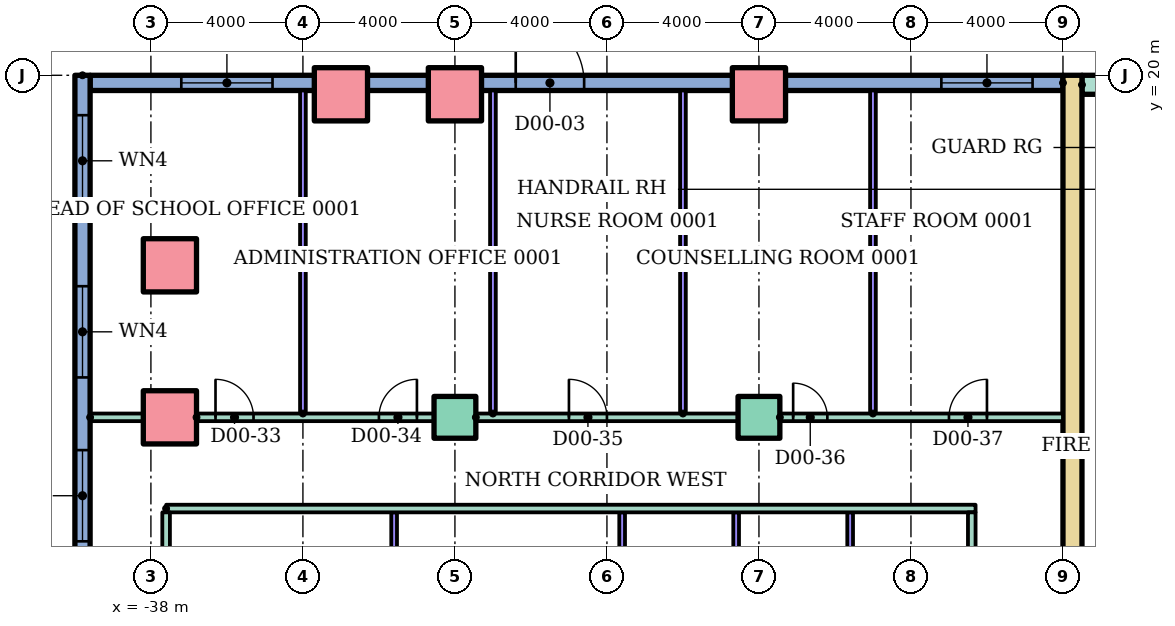
"""IFC4 building model, lengths in metres.
Left out: names, types, materials, properties, quantities, classifications, styles, units other than length and angle.
Written with IfcOpenShell. Run it as: python <this file> out.ifc"""

import sys

from ifc_helpers import new_model, si_unit, direction, frame, frame_2d, origin, origin_2d, place, context, subcontext, project, spatial, rectangle, hollow_rectangle, extrude, element, fill, save


model = new_model("IFC4")
c1 = context("Model", 3, precision=1e-05, world=origin(), true_north=direction((0.0, 1.0)))
c2 = subcontext(c1, "Body", "Model", "MODEL_VIEW")
j1 = project(units=[si_unit("LENGTHUNIT", "METRE"), si_unit("PLANEANGLEUNIT", "RADIAN")], contexts=[c1])
p1 = place(None, origin())
s1 = spatial("IfcSite", under=j1, at=p1, CompositionType="ELEMENT")
p2 = place(p1, origin())
s2 = spatial("IfcBuilding", under=s1, at=p2, CompositionType="ELEMENT")
p3 = place(p2, origin())
s3 = spatial("IfcBuildingStorey", under=s2, at=p3, CompositionType="ELEMENT", Elevation=0.0)
p4 = place(p3, frame((-37.5, 11.0, 0.0)))
e1 = element("IfcColumn", 1, at=p4, inside=s3, PredefinedType="COLUMN", context=c2, shape_type="SweptSolid", body=[
    extrude(hollow_rectangle(XDim=1.4, YDim=1.4, WallThickness=0.08, at=origin_2d()), origin(), (0.0, 0.0, 1.0), 6.0),
])
for number, where in (
    (2, (-30.0, 11.0, 0.0)),
    (3, (-22.0, 11.0, 0.0)),
):
    element("IfcColumn", number, at=place(p3, frame(where)), inside=s3, PredefinedType="COLUMN", context=c2, shape_type="SweptSolid", body=[
        extrude(rectangle(XDim=1.1, YDim=1.1, at=origin_2d()), origin(), (0.0, 0.0, 1.0), 6.0),
    ])
for number, where in (
    (4, (-37.5, 15.0, 0.0)),
    (5, (-33.0, 19.5, 0.0)),
    (6, (-30.0, 19.5, 0.0)),
    (7, (-22.0, 19.5, 0.0)),
):
    element("IfcColumn", number, at=place(p3, frame(where)), inside=s3, PredefinedType="COLUMN", context=c2, shape_type="SweptSolid", body=[
        extrude(hollow_rectangle(XDim=1.4, YDim=1.4, WallThickness=0.08, at=origin_2d()), origin(), (0.0, 0.0, 1.0), 6.0),
    ])
p5 = place(p3, frame((-14.0, 19.8, 0.0), z_axis=(0.0, 0.0, 1.0), x_axis=(-1.0, 0.0, 0.0)))
e8 = element("IfcWall", 8, at=p5, inside=s3, PredefinedType="STANDARD", context=c2, shape_type="SweptSolid", body=[
    extrude(rectangle(XDim=25.6, YDim=0.4, at=frame_2d((12.8, 0.0))), origin(), (0.0, 0.0, 1.0), 5.7),
])
p6 = place(p5, frame((12.6, 0.0, 0.0)))
e9 = element("IfcOpeningElement", 9, at=p6, cuts=e8, PredefinedType="OPENING", context=c2, shape_type="SweptSolid", body=[
    extrude(rectangle(XDim=1.8, YDim=2.4, at=frame_2d((0.9, 1.2))), frame((0.0, 0.21, 0.0), z_axis=(0.0, -1.0, 0.0), x_axis=(1.0, 0.0, 0.0)), (0.0, 0.0, 1.0), 0.42),
])
p7 = place(p5, frame((0.8, 0.0, 0.9)))
e10 = element("IfcOpeningElement", 10, at=p7, cuts=e8, PredefinedType="OPENING", context=c2, shape_type="SweptSolid", body=[
    extrude(rectangle(XDim=2.4, YDim=2.4, at=frame_2d((1.2, 1.2))), frame((0.0, 0.21, 0.0), z_axis=(0.0, -1.0, 0.0), x_axis=(1.0, 0.0, 0.0)), (0.0, 0.0, 1.0), 0.42),
])
p8 = place(p5, frame((20.8, 0.0, 0.9)))
e11 = element("IfcOpeningElement", 11, at=p8, cuts=e8, PredefinedType="OPENING", context=c2, shape_type="SweptSolid", body=[
    extrude(rectangle(XDim=2.4, YDim=2.4, at=frame_2d((1.2, 1.2))), frame((0.0, 0.21, 0.0), z_axis=(0.0, -1.0, 0.0), x_axis=(1.0, 0.0, 0.0)), (0.0, 0.0, 1.0), 0.42),
])
p9 = place(p3, frame((-39.8, 20.0, 0.0), z_axis=(0.0, 0.0, 1.0), x_axis=(0.0, -1.0, 0.0)))
e12 = element("IfcWall", 12, at=p9, inside=s3, PredefinedType="STANDARD", context=c2, shape_type="SweptSolid", body=[
    extrude(rectangle(XDim=70.0, YDim=0.4, at=frame_2d((35.0, 0.0))), origin(), (0.0, 0.0, 1.0), 5.7),
])
p10 = place(p9, frame((50.267, 0.0, 0.0)))
e13 = element("IfcOpeningElement", 13, at=p10, cuts=e12, PredefinedType="OPENING", context=c2, shape_type="SweptSolid", body=[
    extrude(rectangle(XDim=1.8, YDim=2.4, at=frame_2d((0.9, 1.2))), frame((0.0, 0.21, 0.0), z_axis=(0.0, -1.0, 0.0), x_axis=(1.0, 0.0, 0.0)), (0.0, 0.0, 1.0), 0.42),
])
p11 = place(p9, frame((1.05, 0.0, 0.9)))
e14 = element("IfcOpeningElement", 14, at=p11, cuts=e12, PredefinedType="OPENING", context=c2, shape_type="SweptSolid", body=[
    extrude(rectangle(XDim=2.4, YDim=2.4, at=frame_2d((1.2, 1.2))), frame((0.0, 0.21, 0.0), z_axis=(0.0, -1.0, 0.0), x_axis=(1.0, 0.0, 0.0)), (0.0, 0.0, 1.0), 0.42),
])
p12 = place(p9, frame((5.55, 0.0, 0.9)))
e15 = element("IfcOpeningElement", 15, at=p12, cuts=e12, PredefinedType="OPENING", context=c2, shape_type="SweptSolid", body=[
    extrude(rectangle(XDim=2.4, YDim=2.4, at=frame_2d((1.2, 1.2))), frame((0.0, 0.21, 0.0), z_axis=(0.0, -1.0, 0.0), x_axis=(1.0, 0.0, 0.0)), (0.0, 0.0, 1.0), 0.42),
])
p13 = place(p9, frame((9.863, 0.0, 0.9)))
e16 = element("IfcOpeningElement", 16, at=p13, cuts=e12, PredefinedType="OPENING", context=c2, shape_type="SweptSolid", body=[
    extrude(rectangle(XDim=2.4, YDim=2.4, at=frame_2d((1.2, 1.2))), frame((0.0, 0.21, 0.0), z_axis=(0.0, -1.0, 0.0), x_axis=(1.0, 0.0, 0.0)), (0.0, 0.0, 1.0), 0.42),
])
p14 = place(p9, frame((13.988, 0.0, 0.9)))
e17 = element("IfcOpeningElement", 17, at=p14, cuts=e12, PredefinedType="OPENING", context=c2, shape_type="SweptSolid", body=[
    extrude(rectangle(XDim=2.4, YDim=2.4, at=frame_2d((1.2, 1.2))), frame((0.0, 0.21, 0.0), z_axis=(0.0, -1.0, 0.0), x_axis=(1.0, 0.0, 0.0)), (0.0, 0.0, 1.0), 0.42),
])
p15 = place(p9, frame((18.113, 0.0, 0.9)))
e18 = element("IfcOpeningElement", 18, at=p15, cuts=e12, PredefinedType="OPENING", context=c2, shape_type="SweptSolid", body=[
    extrude(rectangle(XDim=2.4, YDim=2.4, at=frame_2d((1.2, 1.2))), frame((0.0, 0.21, 0.0), z_axis=(0.0, -1.0, 0.0), x_axis=(1.0, 0.0, 0.0)), (0.0, 0.0, 1.0), 0.42),
])
p16 = place(p9, frame((22.238, 0.0, 0.9)))
e19 = element("IfcOpeningElement", 19, at=p16, cuts=e12, PredefinedType="OPENING", context=c2, shape_type="SweptSolid", body=[
    extrude(rectangle(XDim=2.4, YDim=2.4, at=frame_2d((1.2, 1.2))), frame((0.0, 0.21, 0.0), z_axis=(0.0, -1.0, 0.0), x_axis=(1.0, 0.0, 0.0)), (0.0, 0.0, 1.0), 0.42),
])
p17 = place(p9, frame((34.613, 0.0, 0.9)))
e20 = element("IfcOpeningElement", 20, at=p17, cuts=e12, PredefinedType="OPENING", context=c2, shape_type="SweptSolid", body=[
    extrude(rectangle(XDim=2.4, YDim=2.4, at=frame_2d((1.2, 1.2))), frame((0.0, 0.21, 0.0), z_axis=(0.0, -1.0, 0.0), x_axis=(1.0, 0.0, 0.0)), (0.0, 0.0, 1.0), 0.42),
])
p18 = place(p9, frame((42.633, 0.0, 0.9)))
e21 = element("IfcOpeningElement", 21, at=p18, cuts=e12, PredefinedType="OPENING", context=c2, shape_type="SweptSolid", body=[
    extrude(rectangle(XDim=2.4, YDim=2.4, at=frame_2d((1.2, 1.2))), frame((0.0, 0.21, 0.0), z_axis=(0.0, -1.0, 0.0), x_axis=(1.0, 0.0, 0.0)), (0.0, 0.0, 1.0), 0.42),
])
p19 = place(p9, frame((46.3, 0.0, 0.9)))
e22 = element("IfcOpeningElement", 22, at=p19, cuts=e12, PredefinedType="OPENING", context=c2, shape_type="SweptSolid", body=[
    extrude(rectangle(XDim=2.4, YDim=2.4, at=frame_2d((1.2, 1.2))), frame((0.0, 0.21, 0.0), z_axis=(0.0, -1.0, 0.0), x_axis=(1.0, 0.0, 0.0)), (0.0, 0.0, 1.0), 0.42),
])
p20 = place(p9, frame((66.85, 0.0, 0.9)))
e23 = element("IfcOpeningElement", 23, at=p20, cuts=e12, PredefinedType="OPENING", context=c2, shape_type="SweptSolid", body=[
    extrude(rectangle(XDim=2.4, YDim=2.4, at=frame_2d((1.2, 1.2))), frame((0.0, 0.21, 0.0), z_axis=(0.0, -1.0, 0.0), x_axis=(1.0, 0.0, 0.0)), (0.0, 0.0, 1.0), 0.42),
])
p21 = place(p9, frame((28.7, 0.0, 0.0)))
e24 = element("IfcOpeningElement", 24, at=p21, cuts=e12, PredefinedType="OPENING", context=c2, shape_type="SweptSolid", body=[
    extrude(rectangle(XDim=1.8, YDim=2.1, at=frame_2d((0.9, 1.05))), frame((0.0, 0.21, 0.0), z_axis=(0.0, -1.0, 0.0), x_axis=(1.0, 0.0, 0.0)), (0.0, 0.0, 1.0), 0.42),
])
p22 = place(p9, frame((39.9, 0.0, 0.0)))
e25 = element("IfcOpeningElement", 25, at=p22, cuts=e12, PredefinedType="OPENING", context=c2, shape_type="SweptSolid", body=[
    extrude(rectangle(XDim=1.8, YDim=2.1, at=frame_2d((0.9, 1.05))), frame((0.0, 0.21, 0.0), z_axis=(0.0, -1.0, 0.0), x_axis=(1.0, 0.0, 0.0)), (0.0, 0.0, 1.0), 0.42),
])
p23 = place(p3, frame((-13.75, 3.0, 0.0), z_axis=(0.0, 0.0, 1.0), x_axis=(0.0, 1.0, 0.0)))
e26 = element("IfcWall", 26, at=p23, inside=s3, PredefinedType="SHEAR", context=c2, shape_type="SweptSolid", body=[
    extrude(rectangle(XDim=17.0, YDim=0.5, at=frame_2d((8.5, 0.0))), origin(), (0.0, 0.0, 1.0), 5.7),
])
p24 = place(p3, frame((-13.5, 19.75, 0.0)))
e27 = element("IfcWall", 27, at=p24, inside=s3, PredefinedType="SHEAR", context=c2, shape_type="SweptSolid", body=[
    extrude(rectangle(XDim=27.0, YDim=0.5, at=frame_2d((13.5, 0.0))), origin(), (0.0, 0.0, 1.0), 5.7),
])
p25 = place(p24, frame((4.4, 0.0, 0.0)))
e28 = element("IfcOpeningElement", 28, at=p25, cuts=e27, PredefinedType="OPENING", context=c2, shape_type="SweptSolid", body=[
    extrude(rectangle(XDim=0.95, YDim=2.1, at=frame_2d((0.475, 1.05))), frame((0.0, 0.26, 0.0), z_axis=(0.0, -1.0, 0.0), x_axis=(1.0, 0.0, 0.0)), (0.0, 0.0, 1.0), 0.52),
])
p26 = place(p24, frame((10.4, 0.0, 0.0)))
e29 = element("IfcOpeningElement", 29, at=p26, cuts=e27, PredefinedType="OPENING", context=c2, shape_type="SweptSolid", body=[
    extrude(rectangle(XDim=0.95, YDim=2.1, at=frame_2d((0.475, 1.05))), frame((0.0, 0.26, 0.0), z_axis=(0.0, -1.0, 0.0), x_axis=(1.0, 0.0, 0.0)), (0.0, 0.0, 1.0), 0.52),
])
p27 = place(p24, frame((16.4, 0.0, 0.0)))
e30 = element("IfcOpeningElement", 30, at=p27, cuts=e27, PredefinedType="OPENING", context=c2, shape_type="SweptSolid", body=[
    extrude(rectangle(XDim=0.95, YDim=2.1, at=frame_2d((0.475, 1.05))), frame((0.0, 0.26, 0.0), z_axis=(0.0, -1.0, 0.0), x_axis=(1.0, 0.0, 0.0)), (0.0, 0.0, 1.0), 0.52),
])
p28 = place(p3, frame((-37.6, 8.6, 0.0)))
e31 = element("IfcWall", 31, at=p28, inside=s3, PredefinedType="PARTITIONING", context=c2, shape_type="SweptSolid", body=[
    extrude(rectangle(XDim=21.3, YDim=0.2, at=frame_2d((10.65, 0.0))), origin(), (0.0, 0.0, 1.0), 5.7),
])
p29 = place(p3, frame((-39.6, 11.0, 0.0)))
e32 = element("IfcWall", 32, at=p29, inside=s3, PredefinedType="PARTITIONING", context=c2, shape_type="SweptSolid", body=[
    extrude(rectangle(XDim=1.4, YDim=0.2, at=frame_2d((0.7, 0.0))), origin(), (0.0, 0.0, 1.0), 5.7),
])
p30 = place(p3, frame((-36.8, 11.0, 0.0)))
e33 = element("IfcWall", 33, at=p30, inside=s3, PredefinedType="PARTITIONING", context=c2, shape_type="SweptSolid", body=[
    extrude(rectangle(XDim=6.25, YDim=0.2, at=frame_2d((3.125, 0.0))), origin(), (0.0, 0.0, 1.0), 5.7),
])
p31 = place(p30, frame((0.5, 0.0, 0.0)))
e34 = element("IfcOpeningElement", 34, at=p31, cuts=e33, PredefinedType="OPENING", context=c2, shape_type="SweptSolid", body=[
    extrude(rectangle(XDim=1.0, YDim=2.1, at=frame_2d((0.5, 1.05))), frame((0.0, 0.11, 0.0), z_axis=(0.0, -1.0, 0.0), x_axis=(1.0, 0.0, 0.0)), (0.0, 0.0, 1.0), 0.22),
])
p32 = place(p30, frame((4.8, 0.0, 0.0)))
e35 = element("IfcOpeningElement", 35, at=p32, cuts=e33, PredefinedType="OPENING", context=c2, shape_type="SweptSolid", body=[
    extrude(rectangle(XDim=1.0, YDim=2.1, at=frame_2d((0.5, 1.05))), frame((0.0, 0.11, 0.0), z_axis=(0.0, -1.0, 0.0), x_axis=(1.0, 0.0, 0.0)), (0.0, 0.0, 1.0), 0.22),
])
p33 = place(p3, frame((-29.45, 11.0, 0.0)))
e36 = element("IfcWall", 36, at=p33, inside=s3, PredefinedType="PARTITIONING", context=c2, shape_type="SweptSolid", body=[
    extrude(rectangle(XDim=6.9, YDim=0.2, at=frame_2d((3.45, 0.0))), origin(), (0.0, 0.0, 1.0), 5.7),
])
p34 = place(p33, frame((2.45, 0.0, 0.0)))
e37 = element("IfcOpeningElement", 37, at=p34, cuts=e36, PredefinedType="OPENING", context=c2, shape_type="SweptSolid", body=[
    extrude(rectangle(XDim=1.0, YDim=2.1, at=frame_2d((0.5, 1.05))), frame((0.0, 0.11, 0.0), z_axis=(0.0, -1.0, 0.0), x_axis=(1.0, 0.0, 0.0)), (0.0, 0.0, 1.0), 0.22),
])
p35 = place(p3, frame((-21.45, 11.0, 0.0)))
e38 = element("IfcWall", 38, at=p35, inside=s3, PredefinedType="PARTITIONING", context=c2, shape_type="SweptSolid", body=[
    extrude(rectangle(XDim=7.45, YDim=0.2, at=frame_2d((3.725, 0.0))), origin(), (0.0, 0.0, 1.0), 5.7),
])
p36 = place(p35, frame((0.35, 0.0, 0.0)))
e39 = element("IfcOpeningElement", 39, at=p36, cuts=e38, PredefinedType="OPENING", context=c2, shape_type="SweptSolid", body=[
    extrude(rectangle(XDim=0.9, YDim=2.1, at=frame_2d((0.45, 1.05))), frame((0.0, 0.11, 0.0), z_axis=(0.0, -1.0, 0.0), x_axis=(1.0, 0.0, 0.0)), (0.0, 0.0, 1.0), 0.22),
])
p37 = place(p35, frame((4.45, 0.0, 0.0)))
e40 = element("IfcOpeningElement", 40, at=p37, cuts=e38, PredefinedType="OPENING", context=c2, shape_type="SweptSolid", body=[
    extrude(rectangle(XDim=1.0, YDim=2.1, at=frame_2d((0.5, 1.05))), frame((0.0, 0.11, 0.0), z_axis=(0.0, -1.0, 0.0), x_axis=(1.0, 0.0, 0.0)), (0.0, 0.0, 1.0), 0.22),
])
p38 = place(p3, frame((-37.6, 2.7, 0.0), z_axis=(0.0, 0.0, 1.0), x_axis=(0.0, 1.0, 0.0)))
e41 = element("IfcWall", 41, at=p38, inside=s3, PredefinedType="PARTITIONING", context=c2, shape_type="SweptSolid", body=[
    extrude(rectangle(XDim=5.8, YDim=0.2, at=frame_2d((2.9, 0.0))), origin(), (0.0, 0.0, 1.0), 5.7),
])
p39 = place(p38, frame((1.8, 0.0, 0.0)))
e42 = element("IfcOpeningElement", 42, at=p39, cuts=e41, PredefinedType="OPENING", context=c2, shape_type="SweptSolid", body=[
    extrude(rectangle(XDim=1.0, YDim=2.1, at=frame_2d((0.5, 1.05))), frame((0.0, 0.11, 0.0), z_axis=(0.0, -1.0, 0.0), x_axis=(1.0, 0.0, 0.0)), (0.0, 0.0, 1.0), 0.22),
])
p40 = place(p3, frame((-34.0, 11.1, 0.0), z_axis=(0.0, 0.0, 1.0), x_axis=(0.0, 1.0, 0.0)))
e43 = element("IfcWall", 43, at=p40, inside=s3, PredefinedType="PARTITIONING", context=c2, shape_type="SweptSolid", body=[
    extrude(rectangle(XDim=8.5, YDim=0.15, at=frame_2d((4.25, 0.0))), origin(), (0.0, 0.0, 1.0), 5.7),
])
p41 = place(p3, frame((-31.6, 1.5, 0.0), z_axis=(0.0, 0.0, 1.0), x_axis=(0.0, 1.0, 0.0)))
e44 = element("IfcWall", 44, at=p41, inside=s3, PredefinedType="PARTITIONING", context=c2, shape_type="SweptSolid", body=[
    extrude(rectangle(XDim=7.0, YDim=0.15, at=frame_2d((3.5, 0.0))), origin(), (0.0, 0.0, 1.0), 5.7),
])
p42 = place(p3, frame((-29.0, 11.1, 0.0), z_axis=(0.0, 0.0, 1.0), x_axis=(0.0, 1.0, 0.0)))
e45 = element("IfcWall", 45, at=p42, inside=s3, PredefinedType="PARTITIONING", context=c2, shape_type="SweptSolid", body=[
    extrude(rectangle(XDim=8.5, YDim=0.15, at=frame_2d((4.25, 0.0))), origin(), (0.0, 0.0, 1.0), 5.7),
])
p43 = place(p3, frame((-25.6, 1.5, 0.0), z_axis=(0.0, 0.0, 1.0), x_axis=(0.0, 1.0, 0.0)))
e46 = element("IfcWall", 46, at=p43, inside=s3, PredefinedType="PARTITIONING", context=c2, shape_type="SweptSolid", body=[
    extrude(rectangle(XDim=7.0, YDim=0.15, at=frame_2d((3.5, 0.0))), origin(), (0.0, 0.0, 1.0), 5.7),
])
p44 = place(p3, frame((-24.0, 11.1, 0.0), z_axis=(0.0, 0.0, 1.0), x_axis=(0.0, 1.0, 0.0)))
e47 = element("IfcWall", 47, at=p44, inside=s3, PredefinedType="PARTITIONING", context=c2, shape_type="SweptSolid", body=[
    extrude(rectangle(XDim=8.5, YDim=0.15, at=frame_2d((4.25, 0.0))), origin(), (0.0, 0.0, 1.0), 5.7),
])
p45 = place(p3, frame((-22.6, 2.55, 0.0), z_axis=(0.0, 0.0, 1.0), x_axis=(0.0, 1.0, 0.0)))
e48 = element("IfcWall", 48, at=p45, inside=s3, PredefinedType="PARTITIONING", context=c2, shape_type="SweptSolid", body=[
    extrude(rectangle(XDim=5.95, YDim=0.15, at=frame_2d((2.975, 0.0))), origin(), (0.0, 0.0, 1.0), 5.7),
])
p46 = place(p3, frame((-19.6, 1.5, 0.0), z_axis=(0.0, 0.0, 1.0), x_axis=(0.0, 1.0, 0.0)))
e49 = element("IfcWall", 49, at=p46, inside=s3, PredefinedType="PARTITIONING", context=c2, shape_type="SweptSolid", body=[
    extrude(rectangle(XDim=7.0, YDim=0.15, at=frame_2d((3.5, 0.0))), origin(), (0.0, 0.0, 1.0), 5.7),
])
p47 = place(p3, frame((-19.0, 11.1, 0.0), z_axis=(0.0, 0.0, 1.0), x_axis=(0.0, 1.0, 0.0)))
e50 = element("IfcWall", 50, at=p47, inside=s3, PredefinedType="PARTITIONING", context=c2, shape_type="SweptSolid", body=[
    extrude(rectangle(XDim=8.5, YDim=0.15, at=frame_2d((4.25, 0.0))), origin(), (0.0, 0.0, 1.0), 5.7),
])
p48 = place(p3, frame((-16.4, 1.5, 0.0), z_axis=(0.0, 0.0, 1.0), x_axis=(0.0, 1.0, 0.0)))
e51 = element("IfcWall", 51, at=p48, inside=s3, PredefinedType="PARTITIONING", context=c2, shape_type="SweptSolid", body=[
    extrude(rectangle(XDim=7.0, YDim=0.2, at=frame_2d((3.5, 0.0))), origin(), (0.0, 0.0, 1.0), 5.7),
])
p49 = place(p6, frame((1.8, 0.0, 0.0), z_axis=(0.0, 0.0, 1.0), x_axis=(-1.0, 0.0, 0.0)))
e52 = element("IfcDoor", 52, at=p49, inside=s3, OperationType="DOUBLE_DOOR_SINGLE_SWING", PredefinedType="DOOR", context=c2, shape_type="SweptSolid", body=[
    extrude(rectangle(XDim=1.8, YDim=2.4, at=frame_2d((0.9, 1.2))), frame((0.0, 0.025, 0.0), z_axis=(0.0, -1.0, 0.0), x_axis=(1.0, 0.0, 0.0)), (0.0, 0.0, 1.0), 0.05),
])
fill(e9, e52)
p50 = place(p7, origin())
e53 = element("IfcWindow", 53, at=p50, inside=s3, PartitioningType="SINGLE_PANEL", PredefinedType="WINDOW", context=c2, shape_type="SweptSolid", body=[
    extrude(rectangle(XDim=2.4, YDim=2.4, at=frame_2d((1.2, 1.2))), frame((0.0, 0.03, 0.0), z_axis=(0.0, -1.0, 0.0), x_axis=(1.0, 0.0, 0.0)), (0.0, 0.0, 1.0), 0.06),
])
fill(e10, e53)
p51 = place(p8, origin())
e54 = element("IfcWindow", 54, at=p51, inside=s3, PartitioningType="SINGLE_PANEL", PredefinedType="WINDOW", context=c2, shape_type="SweptSolid", body=[
    extrude(rectangle(XDim=2.4, YDim=2.4, at=frame_2d((1.2, 1.2))), frame((0.0, 0.03, 0.0), z_axis=(0.0, -1.0, 0.0), x_axis=(1.0, 0.0, 0.0)), (0.0, 0.0, 1.0), 0.06),
])
fill(e11, e54)
p52 = place(p11, origin())
e55 = element("IfcWindow", 55, at=p52, inside=s3, PartitioningType="SINGLE_PANEL", PredefinedType="WINDOW", context=c2, shape_type="SweptSolid", body=[
    extrude(rectangle(XDim=2.4, YDim=2.4, at=frame_2d((1.2, 1.2))), frame((0.0, 0.03, 0.0), z_axis=(0.0, -1.0, 0.0), x_axis=(1.0, 0.0, 0.0)), (0.0, 0.0, 1.0), 0.06),
])
fill(e14, e55)
p53 = place(p12, origin())
e56 = element("IfcWindow", 56, at=p53, inside=s3, PartitioningType="SINGLE_PANEL", PredefinedType="WINDOW", context=c2, shape_type="SweptSolid", body=[
    extrude(rectangle(XDim=2.4, YDim=2.4, at=frame_2d((1.2, 1.2))), frame((0.0, 0.03, 0.0), z_axis=(0.0, -1.0, 0.0), x_axis=(1.0, 0.0, 0.0)), (0.0, 0.0, 1.0), 0.06),
])
fill(e15, e56)
p54 = place(p13, origin())
e57 = element("IfcWindow", 57, at=p54, inside=s3, PartitioningType="SINGLE_PANEL", PredefinedType="WINDOW", context=c2, shape_type="SweptSolid", body=[
    extrude(rectangle(XDim=2.4, YDim=2.4, at=frame_2d((1.2, 1.2))), frame((0.0, 0.03, 0.0), z_axis=(0.0, -1.0, 0.0), x_axis=(1.0, 0.0, 0.0)), (0.0, 0.0, 1.0), 0.06),
])
fill(e16, e57)
p55 = place(p31, origin())
e58 = element("IfcDoor", 58, at=p55, inside=s3, OperationType="SINGLE_SWING_LEFT", PredefinedType="DOOR", context=c2, shape_type="SweptSolid", body=[
    extrude(rectangle(XDim=1.0, YDim=2.1, at=frame_2d((0.5, 1.05))), frame((0.0, 0.025, 0.0), z_axis=(0.0, -1.0, 0.0), x_axis=(1.0, 0.0, 0.0)), (0.0, 0.0, 1.0), 0.05),
])
fill(e34, e58)
p56 = place(p32, origin())
e59 = element("IfcDoor", 59, at=p56, inside=s3, OperationType="SINGLE_SWING_RIGHT", PredefinedType="DOOR", context=c2, shape_type="SweptSolid", body=[
    extrude(rectangle(XDim=1.0, YDim=2.1, at=frame_2d((0.5, 1.05))), frame((0.0, 0.025, 0.0), z_axis=(0.0, -1.0, 0.0), x_axis=(1.0, 0.0, 0.0)), (0.0, 0.0, 1.0), 0.05),
])
fill(e35, e59)
p57 = place(p34, origin())
e60 = element("IfcDoor", 60, at=p57, inside=s3, OperationType="SINGLE_SWING_LEFT", PredefinedType="DOOR", context=c2, shape_type="SweptSolid", body=[
    extrude(rectangle(XDim=1.0, YDim=2.1, at=frame_2d((0.5, 1.05))), frame((0.0, 0.025, 0.0), z_axis=(0.0, -1.0, 0.0), x_axis=(1.0, 0.0, 0.0)), (0.0, 0.0, 1.0), 0.05),
])
fill(e37, e60)
p58 = place(p36, origin())
e61 = element("IfcDoor", 61, at=p58, inside=s3, OperationType="SINGLE_SWING_LEFT", PredefinedType="DOOR", context=c2, shape_type="SweptSolid", body=[
    extrude(rectangle(XDim=0.9, YDim=2.1, at=frame_2d((0.45, 1.05))), frame((0.0, 0.025, 0.0), z_axis=(0.0, -1.0, 0.0), x_axis=(1.0, 0.0, 0.0)), (0.0, 0.0, 1.0), 0.05),
])
fill(e39, e61)
p59 = place(p37, origin())
e62 = element("IfcDoor", 62, at=p59, inside=s3, OperationType="SINGLE_SWING_RIGHT", PredefinedType="DOOR", context=c2, shape_type="SweptSolid", body=[
    extrude(rectangle(XDim=1.0, YDim=2.1, at=frame_2d((0.5, 1.05))), frame((0.0, 0.025, 0.0), z_axis=(0.0, -1.0, 0.0), x_axis=(1.0, 0.0, 0.0)), (0.0, 0.0, 1.0), 0.05),
])
fill(e40, e62)
save(model, sys.argv[1])
